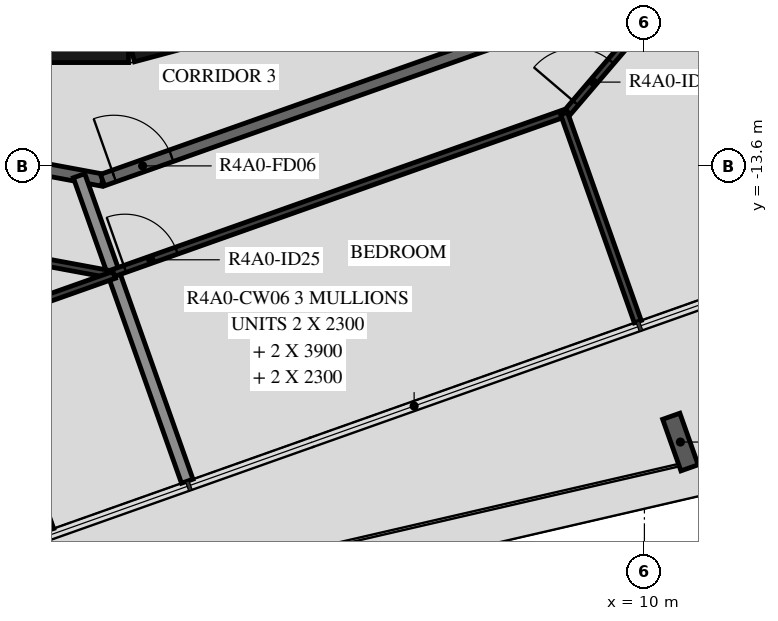
"""IFC4 building model, lengths in metres.
Left out: names, types, materials, properties, quantities, classifications, styles, units other than length and angle.
Written with IfcOpenShell. Run it as: python <this file> out.ifc"""

import sys

from ifc_helpers import new_model, si_unit, direction, frame, frame_2d, origin, origin_2d, place, context, subcontext, project, spatial, rectangle, i_section, extrude, element, fill, save


model = new_model("IFC4")
c1 = context("Model", 3, precision=1e-05, world=origin(), true_north=direction((0.0, 1.0)))
c2 = subcontext(c1, "Body", "Model", "MODEL_VIEW")
j1 = project(units=[si_unit("LENGTHUNIT", "METRE"), si_unit("PLANEANGLEUNIT", "RADIAN")], contexts=[c1])
p1 = place(None, origin())
s1 = spatial("IfcSite", under=j1, at=p1, CompositionType="ELEMENT")
p2 = place(p1, origin())
s2 = spatial("IfcBuilding", under=s1, at=p2, CompositionType="ELEMENT")
p3 = place(p2, frame((0.0, 0.0, 151.7)))
s3 = spatial("IfcBuildingStorey", under=s2, at=p3, CompositionType="ELEMENT", Elevation=151.7)
p4 = place(p3, frame((10.592, -18.138, -0.45), z_axis=(0.0, 0.0, 1.0), x_axis=(-0.942641392079, -0.333807138839, 0.0)))
e1 = element("IfcColumn", 1, at=p4, inside=s3, PredefinedType="COLUMN", context=c2, shape_type="SweptSolid", body=[
    extrude(i_section(OverallWidth=0.3, OverallDepth=0.9, WebThickness=0.019, FlangeThickness=0.035, FilletRadius=0.03, at=origin_2d()), origin(), (0.0, 0.0, 1.0), 3.57),
])
p5 = place(p3, frame((-2.758, -20.552, 0.0), z_axis=(0.0, 0.0, 1.0), x_axis=(0.94265323131, 0.333773704029, 0.0)))
e2 = element("IfcWall", 2, at=p5, inside=s3, PredefinedType="STANDARD", context=c2, shape_type="SweptSolid", body=[
    extrude(rectangle(XDim=3.2, YDim=0.16, at=frame_2d((1.6, 0.0))), origin(), (0.0, 0.0, 1.0), 3.12),
])
p6 = place(p5, frame((0.4, 0.0, 0.0)))
e3 = element("IfcOpeningElement", 3, at=p6, cuts=e2, PredefinedType="OPENING", context=c2, shape_type="SweptSolid", body=[
    extrude(rectangle(XDim=2.4, YDim=2.4, at=frame_2d((1.2, 1.2))), frame((0.0, 0.09, 0.0), z_axis=(0.0, -1.0, 0.0), x_axis=(1.0, 0.0, 0.0)), (0.0, 0.0, 1.0), 0.18),
])
p7 = place(p3, frame((1.55, -11.643, 0.0), z_axis=(0.0, 0.0, 1.0), x_axis=(0.965948410781, 0.258734743916, 0.0)))
e4 = element("IfcWall", 4, at=p7, inside=s3, PredefinedType="SHEAR", context=c2, shape_type="SweptSolid", body=[
    extrude(rectangle(XDim=3.033, YDim=0.5, at=frame_2d((1.516, 0.0))), origin(), (0.0, 0.0, 1.0), 3.12),
])
p8 = place(p3, frame((-1.516, -11.647, 0.0), z_axis=(0.0, 0.0, 1.0), x_axis=(1.0, 0.0, 0.0)))
e5 = element("IfcWall", 5, at=p8, inside=s3, PredefinedType="SHEAR", context=c2, shape_type="SweptSolid", body=[
    extrude(rectangle(XDim=3.033, YDim=0.5, at=frame_2d((1.516, 0.0))), origin(), (0.0, 0.0, 1.0), 3.12),
])
p9 = place(p8, frame((0.016, 0.0, 0.0)))
e6 = element("IfcOpeningElement", 6, at=p9, cuts=e5, PredefinedType="OPENING", context=c2, shape_type="SweptSolid", body=[
    extrude(rectangle(XDim=1.2, YDim=2.1, at=frame_2d((0.6, 1.05))), frame((0.0, 0.26, 0.0), z_axis=(0.0, -1.0, 0.0), x_axis=(1.0, 0.0, 0.0)), (0.0, 0.0, 1.0), 0.52),
])
p10 = place(p3, frame((-5.972, -12.521, 0.0), z_axis=(0.0, 0.0, 1.0), x_axis=(0.983256068163, -0.18222926335, 0.0)))
e7 = element("IfcWall", 7, at=p10, inside=s3, PredefinedType="STANDARD", context=c2, shape_type="SweptSolid", body=[
    extrude(rectangle(XDim=7.181, YDim=0.2, at=frame_2d((3.59, 0.0))), origin(), (0.0, 0.0, 1.0), 3.12),
])
p11 = place(p10, frame((4.7, 0.0, 0.0)))
e8 = element("IfcOpeningElement", 8, at=p11, cuts=e7, PredefinedType="OPENING", context=c2, shape_type="SweptSolid", body=[
    extrude(rectangle(XDim=1.0, YDim=2.1, at=frame_2d((0.5, 1.05))), frame((0.0, 0.11, 0.0), z_axis=(0.0, -1.0, 0.0), x_axis=(1.0, 0.0, 0.0)), (0.0, 0.0, 1.0), 0.22),
])
p12 = place(p3, frame((1.088, -13.83, 0.0), z_axis=(0.0, 0.0, 1.0), x_axis=(0.942648397945, 0.333787354241, 0.0)))
e9 = element("IfcWall", 9, at=p12, inside=s3, PredefinedType="STANDARD", context=c2, shape_type="SweptSolid", body=[
    extrude(rectangle(XDim=7.181, YDim=0.2, at=frame_2d((3.591, 0.0))), origin(), (0.0, 0.0, 1.0), 3.12),
])
p13 = place(p12, frame((0.2, 0.0, 0.0)))
e10 = element("IfcOpeningElement", 10, at=p13, cuts=e9, PredefinedType="OPENING", context=c2, shape_type="SweptSolid", body=[
    extrude(rectangle(XDim=1.0, YDim=2.1, at=frame_2d((0.5, 1.05))), frame((0.0, 0.11, 0.0), z_axis=(0.0, -1.0, 0.0), x_axis=(1.0, 0.0, 0.0)), (0.0, 0.0, 1.0), 0.22),
])
p14 = place(p3, frame((2.482, -18.782, 0.0), z_axis=(0.0, 0.0, 1.0), x_axis=(-0.333807281402, 0.942641341594, 0.0)))
e11 = element("IfcWall", 11, at=p14, inside=s3, PredefinedType="STANDARD", context=c2, shape_type="SweptSolid", body=[
    extrude(rectangle(XDim=5.329, YDim=0.2, at=frame_2d((2.665, 0.0))), origin(), (0.0, 0.0, 1.0), 2.73),
])
p15 = place(p3, frame((-6.641, -13.923, 0.0), z_axis=(0.0, 0.0, 1.0), x_axis=(0.983250157272, -0.182261153912, 0.0)))
e12 = element("IfcWall", 12, at=p15, inside=s3, PredefinedType="PARTITIONING", context=c2, shape_type="SweptSolid", body=[
    extrude(rectangle(XDim=7.985, YDim=0.12, at=frame_2d((3.992, 0.0))), origin(), (0.0, 0.0, 1.0), 3.12),
])
p16 = place(p15, frame((1.612, 0.0, 0.0)))
e13 = element("IfcOpeningElement", 13, at=p16, cuts=e12, PredefinedType="OPENING", context=c2, shape_type="SweptSolid", body=[
    extrude(rectangle(XDim=0.8, YDim=2.1, at=frame_2d((0.4, 1.05))), frame((0.0, 0.07, 0.0), z_axis=(0.0, -1.0, 0.0), x_axis=(1.0, 0.0, 0.0)), (0.0, 0.0, 1.0), 0.14),
])
p17 = place(p3, frame((-4.17, -17.318, 0.0), z_axis=(0.0, 0.0, 1.0), x_axis=(0.942641343532, 0.333807275931, 0.0)))
e14 = element("IfcWall", 14, at=p17, inside=s3, PredefinedType="PARTITIONING", context=c2, shape_type="SweptSolid", body=[
    extrude(rectangle(XDim=5.781, YDim=0.12, at=frame_2d((2.891, 0.0))), origin(), (0.0, 0.0, 1.0), 3.12),
])
p18 = place(p3, frame((1.269, -15.357, 0.0), z_axis=(0.0, 0.0, 1.0), x_axis=(0.942639442898, 0.333812643101, 0.0)))
e15 = element("IfcWall", 15, at=p18, inside=s3, PredefinedType="PARTITIONING", context=c2, shape_type="SweptSolid", body=[
    extrude(rectangle(XDim=7.86, YDim=0.12, at=frame_2d((3.93, 0.0))), origin(), (0.0, 0.0, 1.0), 3.12),
])
p19 = place(p18, frame((0.2, 0.0, 0.0)))
e16 = element("IfcOpeningElement", 16, at=p19, cuts=e15, PredefinedType="OPENING", context=c2, shape_type="SweptSolid", body=[
    extrude(rectangle(XDim=0.9, YDim=2.1, at=frame_2d((0.45, 1.05))), frame((0.0, 0.07, 0.0), z_axis=(0.0, -1.0, 0.0), x_axis=(1.0, 0.0, 0.0)), (0.0, 0.0, 1.0), 0.14),
])
p20 = place(p3, frame((8.737, -12.713, 0.0), z_axis=(0.0, 0.0, 1.0), x_axis=(0.649430604754, 0.760420863476, 0.0)))
e17 = element("IfcWall", 17, at=p20, inside=s3, PredefinedType="PARTITIONING", context=c2, shape_type="SweptSolid", body=[
    extrude(rectangle(XDim=7.985, YDim=0.12, at=frame_2d((3.992, 0.0))), origin(), (0.0, 0.0, 1.0), 3.12),
])
p21 = place(p20, frame((0.2, 0.0, 0.0)))
e18 = element("IfcOpeningElement", 18, at=p21, cuts=e17, PredefinedType="OPENING", context=c2, shape_type="SweptSolid", body=[
    extrude(rectangle(XDim=0.9, YDim=2.1, at=frame_2d((0.45, 1.05))), frame((0.0, 0.07, 0.0), z_axis=(0.0, -1.0, 0.0), x_axis=(1.0, 0.0, 0.0)), (0.0, 0.0, 1.0), 0.14),
])
p22 = place(p20, frame((6.234, 0.0, 0.0)))
e19 = element("IfcOpeningElement", 19, at=p22, cuts=e17, PredefinedType="OPENING", context=c2, shape_type="SweptSolid", body=[
    extrude(rectangle(XDim=0.8, YDim=2.1, at=frame_2d((0.4, 1.05))), frame((0.0, 0.07, 0.0), z_axis=(0.0, -1.0, 0.0), x_axis=(1.0, 0.0, 0.0)), (0.0, 0.0, 1.0), 0.14),
])
p23 = place(p3, frame((9.891, -16.158, 0.0), z_axis=(0.0, 0.0, 1.0), x_axis=(-0.33385336213, 0.942625022262, 0.0)))
e20 = element("IfcWall", 20, at=p23, inside=s3, PredefinedType="PARTITIONING", context=c2, shape_type="SweptSolid", body=[
    extrude(rectangle(XDim=3.633, YDim=0.12, at=frame_2d((1.816, 0.0))), origin(), (0.0, 0.0, 1.0), 2.73),
])
p24 = place(p13, origin())
e21 = element("IfcDoor", 21, at=p24, inside=s3, OperationType="SINGLE_SWING_LEFT", PredefinedType="DOOR", context=c2, shape_type="SweptSolid", body=[
    extrude(rectangle(XDim=1.0, YDim=2.1, at=frame_2d((0.5, 1.05))), frame((0.0, 0.025, 0.0), z_axis=(0.0, -1.0, 0.0), x_axis=(1.0, 0.0, 0.0)), (0.0, 0.0, 1.0), 0.05),
])
fill(e10, e21)
p25 = place(p19, origin())
e22 = element("IfcDoor", 22, at=p25, inside=s3, OperationType="SINGLE_SWING_LEFT", PredefinedType="DOOR", context=c2, shape_type="SweptSolid", body=[
    extrude(rectangle(XDim=0.9, YDim=2.1, at=frame_2d((0.45, 1.05))), frame((0.0, 0.025, 0.0), z_axis=(0.0, -1.0, 0.0), x_axis=(1.0, 0.0, 0.0)), (0.0, 0.0, 1.0), 0.05),
])
fill(e16, e22)
p26 = place(p21, origin())
e23 = element("IfcDoor", 23, at=p26, inside=s3, OperationType="SINGLE_SWING_RIGHT", PredefinedType="DOOR", context=c2, shape_type="SweptSolid", body=[
    extrude(rectangle(XDim=0.9, YDim=2.1, at=frame_2d((0.45, 1.05))), frame((0.0, 0.025, 0.0), z_axis=(0.0, -1.0, 0.0), x_axis=(1.0, 0.0, 0.0)), (0.0, 0.0, 1.0), 0.05),
])
fill(e18, e23)
save(model, sys.argv[1])
